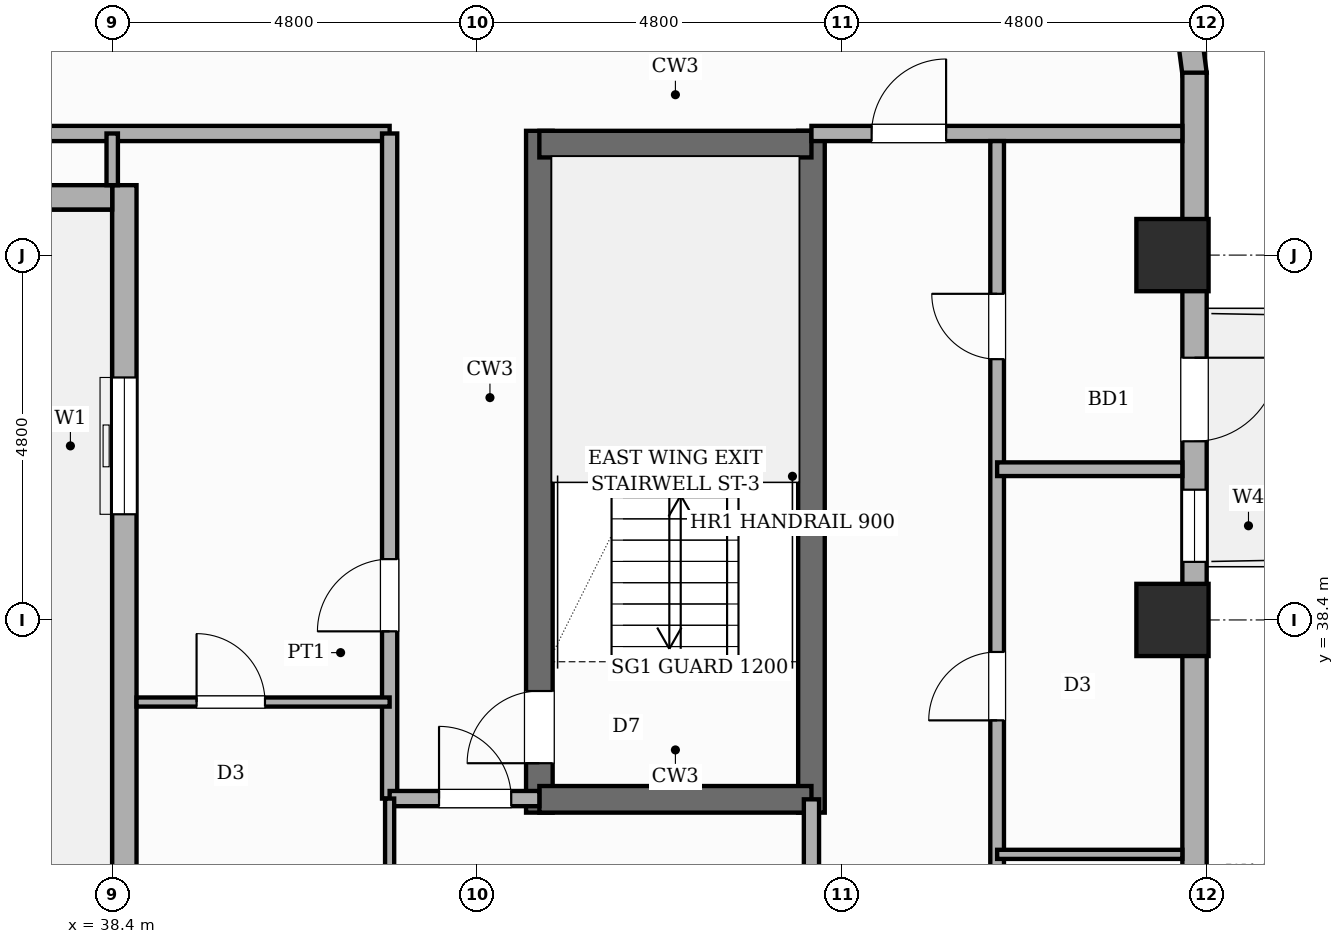
"""IFC4 building model, lengths in metres.
Left out: names, types, materials, properties, quantities, classifications, styles, units other than length and angle.
Written with IfcOpenShell. Run it as: python <this file> out.ifc"""

import sys

from ifc_helpers import new_model, si_unit, direction, frame, frame_2d, origin, origin_2d, place, context, subcontext, project, spatial, rectangle, extrude, element, fill, save


model = new_model("IFC4")
c1 = context("Model", 3, precision=1e-05, world=origin(), true_north=direction((0.0, 1.0)))
c2 = subcontext(c1, "Body", "Model", "MODEL_VIEW")
j1 = project(units=[si_unit("LENGTHUNIT", "METRE"), si_unit("PLANEANGLEUNIT", "RADIAN")], contexts=[c1])
p1 = place(None, origin())
s1 = spatial("IfcSite", under=j1, at=p1, CompositionType="ELEMENT")
p2 = place(p1, origin())
s2 = spatial("IfcBuilding", under=s1, at=p2, CompositionType="ELEMENT")
p3 = place(p2, frame((0.0, 0.0, 154.0)))
s3 = spatial("IfcBuildingStorey", under=s2, at=p3, CompositionType="ELEMENT", Elevation=154.0)
p4 = place(p3, frame((44.02, 35.865, 0.0), z_axis=(0.0, 0.0, 1.0), x_axis=(0.0, 1.0, 0.0)))
e1 = element("IfcWall", 1, at=p4, inside=s3, PredefinedType="SHEAR", context=c2, shape_type="SweptSolid", body=[
    extrude(rectangle(XDim=8.97, YDim=0.35, at=frame_2d((4.485, 0.0))), origin(), (0.0, 0.0, 1.0), 3.6),
])
p5 = place(p4, frame((0.65, 0.0, 0.0)))
e2 = element("IfcOpeningElement", 2, at=p5, cuts=e1, PredefinedType="OPENING", context=c2, shape_type="SweptSolid", body=[
    extrude(rectangle(XDim=0.95, YDim=2.1, at=frame_2d((0.475, 1.05))), frame((0.0, 0.185, 0.0), z_axis=(0.0, -1.0, 0.0), x_axis=(1.0, 0.0, 0.0)), (0.0, 0.0, 1.0), 0.37),
])
p6 = place(p3, frame((47.6, 35.865, 0.0), z_axis=(0.0, 0.0, 1.0), x_axis=(0.0, 1.0, 0.0)))
e3 = element("IfcWall", 3, at=p6, inside=s3, PredefinedType="SHEAR", context=c2, shape_type="SweptSolid", body=[
    extrude(rectangle(XDim=8.97, YDim=0.35, at=frame_2d((4.485, 0.0))), origin(), (0.0, 0.0, 1.0), 3.6),
])
for number, where, z_axis, x_axis in (
    (4, (44.02, 36.04, 0.0), (0.0, 0.0, 1.0), (1.0, 0.0, 0.0)),
    (5, (44.02, 44.66, 0.0), (0.0, 0.0, 1.0), (1.0, 0.0, 0.0)),
):
    element("IfcWall", number, at=place(p3, frame(where, z_axis=z_axis, x_axis=x_axis)), inside=s3, PredefinedType="SHEAR", context=c2, shape_type="SweptSolid", body=[
        extrude(rectangle(XDim=3.58, YDim=0.35, at=frame_2d((1.79, 0.0))), origin(), (0.0, 0.0, 1.0), 3.6),
    ])
for number, where, z_axis, x_axis in (
    (6, (52.35, 38.4, 0.0), (0.0, 0.0, 1.0), (1.0, 0.0, 0.0)),
    (7, (52.35, 43.2, 0.0), (0.0, 0.0, 1.0), (1.0, 0.0, 0.0)),
):
    element("IfcColumn", number, at=place(p3, frame(where, z_axis=z_axis, x_axis=x_axis)), inside=s3, PredefinedType="COLUMN", context=c2, shape_type="SweptSolid", body=[
        extrude(rectangle(XDim=0.95, YDim=0.95, at=origin_2d()), origin(), (0.0, 0.0, 1.0), 3.6),
    ])
p7 = place(p3, frame((52.56, 46.2, 0.0), z_axis=(0.0, 0.0, 1.0), x_axis=(0.130555323746, -0.9914410257, 0.0)))
e8 = element("IfcWall", 8, at=p7, inside=s3, PredefinedType="STANDARD", context=c2, shape_type="SweptSolid", body=[
    extrude(rectangle(XDim=0.626, YDim=0.32, at=frame_2d((0.313, 0.0))), origin(), (0.0, 0.0, 1.0), 2.54),
])
p8 = place(p3, frame((52.64, 45.6, 0.0), z_axis=(0.0, 0.0, 1.0), x_axis=(0.0, -1.0, 0.0)))
e9 = element("IfcWall", 9, at=p8, inside=s3, PredefinedType="STANDARD", context=c2, shape_type="SweptSolid", body=[
    extrude(rectangle(XDim=14.4, YDim=0.32, at=frame_2d((7.2, 0.0))), origin(), (0.0, 0.0, 1.0), 2.54),
])
p9 = place(p8, frame((3.75, 0.0, 0.0)))
e10 = element("IfcOpeningElement", 10, at=p9, cuts=e9, PredefinedType="OPENING", context=c2, shape_type="SweptSolid", body=[
    extrude(rectangle(XDim=1.1, YDim=2.15, at=frame_2d((0.55, 1.075))), frame((0.0, 0.17, 0.0), z_axis=(0.0, -1.0, 0.0), x_axis=(1.0, 0.0, 0.0)), (0.0, 0.0, 1.0), 0.34),
])
p10 = place(p8, frame((10.52, 0.0, 0.45)))
e11 = element("IfcOpeningElement", 11, at=p10, cuts=e9, PredefinedType="OPENING", context=c2, shape_type="SweptSolid", body=[
    extrude(rectangle(XDim=0.75, YDim=1.8, at=frame_2d((0.375, 0.9))), frame((0.0, 0.17, 0.0), z_axis=(0.0, -1.0, 0.0), x_axis=(1.0, 0.0, 0.0)), (0.0, 0.0, 1.0), 0.34),
])
p11 = place(p8, frame((5.486, 0.0, 0.45)))
e12 = element("IfcOpeningElement", 12, at=p11, cuts=e9, PredefinedType="OPENING", context=c2, shape_type="SweptSolid", body=[
    extrude(rectangle(XDim=0.95, YDim=1.8, at=frame_2d((0.475, 0.9))), frame((0.0, 0.17, 0.0), z_axis=(0.0, -1.0, 0.0), x_axis=(1.0, 0.0, 0.0)), (0.0, 0.0, 1.0), 0.34),
])
p12 = place(p3, frame((38.56, 28.8, 0.0), z_axis=(0.0, 0.0, 1.0), x_axis=(0.0, 1.0, 0.0)))
e13 = element("IfcWall", 13, at=p12, inside=s3, PredefinedType="STANDARD", context=c2, shape_type="SweptSolid", body=[
    extrude(rectangle(XDim=15.32, YDim=0.32, at=frame_2d((7.66, 0.0))), origin(), (0.0, 0.0, 1.0), 3.36),
])
p13 = place(p12, frame((10.99, 0.0, 0.8)))
e14 = element("IfcOpeningElement", 14, at=p13, cuts=e13, PredefinedType="OPENING", context=c2, shape_type="SweptSolid", body=[
    extrude(rectangle(XDim=1.8, YDim=2.1, at=frame_2d((0.9, 1.05))), frame((0.0, 0.17, 0.0), z_axis=(0.0, -1.0, 0.0), x_axis=(1.0, 0.0, 0.0)), (0.0, 0.0, 1.0), 0.34),
])
p14 = place(p12, frame((3.45, 0.0, 0.8)))
e15 = element("IfcOpeningElement", 15, at=p14, cuts=e13, PredefinedType="OPENING", context=c2, shape_type="SweptSolid", body=[
    extrude(rectangle(XDim=1.8, YDim=2.1, at=frame_2d((0.9, 1.05))), frame((0.0, 0.17, 0.0), z_axis=(0.0, -1.0, 0.0), x_axis=(1.0, 0.0, 0.0)), (0.0, 0.0, 1.0), 0.34),
])
p15 = place(p3, frame((38.4, 43.96, 0.0), z_axis=(0.0, 0.0, 1.0), x_axis=(-1.0, 0.0, 0.0)))
e16 = element("IfcWall", 16, at=p15, inside=s3, PredefinedType="STANDARD", context=c2, shape_type="SweptSolid", body=[
    extrude(rectangle(XDim=12.32, YDim=0.32, at=frame_2d((6.16, 0.0))), origin(), (0.0, 0.0, 1.0), 3.36),
])
p16 = place(p15, frame((5.26, 0.0, 0.8)))
e17 = element("IfcOpeningElement", 17, at=p16, cuts=e16, PredefinedType="OPENING", context=c2, shape_type="SweptSolid", body=[
    extrude(rectangle(XDim=1.8, YDim=2.1, at=frame_2d((0.9, 1.05))), frame((0.0, 0.17, 0.0), z_axis=(0.0, -1.0, 0.0), x_axis=(1.0, 0.0, 0.0)), (0.0, 0.0, 1.0), 0.34),
])
p17 = place(p3, frame((24.75, 44.8, 0.0), z_axis=(0.0, 0.0, 1.0), x_axis=(1.0, 0.0, 0.0)))
e18 = element("IfcWall", 18, at=p17, inside=s3, PredefinedType="PARTITIONING", context=c2, shape_type="SweptSolid", body=[
    extrude(rectangle(XDim=17.3, YDim=0.2, at=frame_2d((8.65, 0.0))), origin(), (0.0, 0.0, 1.0), 3.36),
])
p18 = place(p17, frame((6.2, 0.0, 0.0)))
e19 = element("IfcOpeningElement", 19, at=p18, cuts=e18, PredefinedType="OPENING", context=c2, shape_type="SweptSolid", body=[
    extrude(rectangle(XDim=0.95, YDim=2.15, at=frame_2d((0.475, 1.075))), frame((0.0, 0.11, 0.0), z_axis=(0.0, -1.0, 0.0), x_axis=(1.0, 0.0, 0.0)), (0.0, 0.0, 1.0), 0.22),
])
p19 = place(p3, frame((38.4, 44.12, 0.0), z_axis=(0.0, 0.0, 1.0), x_axis=(0.0, 1.0, 0.0)))
e20 = element("IfcWall", 20, at=p19, inside=s3, PredefinedType="PARTITIONING", context=c2, shape_type="SweptSolid", body=[
    extrude(rectangle(XDim=0.68, YDim=0.15, at=frame_2d((0.34, 0.0))), origin(), (0.0, 0.0, 1.0), 3.36),
])
p20 = place(p3, frame((47.6, 44.8, 0.0), z_axis=(0.0, 0.0, 1.0), x_axis=(1.0, 0.0, 0.0)))
e21 = element("IfcWall", 21, at=p20, inside=s3, PredefinedType="PARTITIONING", context=c2, shape_type="SweptSolid", body=[
    extrude(rectangle(XDim=4.88, YDim=0.2, at=frame_2d((2.44, 0.0))), origin(), (0.0, 0.0, 1.0), 3.36),
])
p21 = place(p20, frame((0.792, 0.0, 0.0)))
e22 = element("IfcOpeningElement", 22, at=p21, cuts=e21, PredefinedType="OPENING", context=c2, shape_type="SweptSolid", body=[
    extrude(rectangle(XDim=0.98, YDim=2.18, at=frame_2d((0.49, 1.09))), frame((0.0, 0.11, 0.0), z_axis=(0.0, -1.0, 0.0), x_axis=(1.0, 0.0, 0.0)), (0.0, 0.0, 1.0), 0.22),
])
p22 = place(p3, frame((42.05, 36.05, 0.0), z_axis=(0.0, 0.0, 1.0), x_axis=(0.0, 1.0, 0.0)))
e23 = element("IfcWall", 23, at=p22, inside=s3, PredefinedType="PARTITIONING", context=c2, shape_type="SweptSolid", body=[
    extrude(rectangle(XDim=8.75, YDim=0.2, at=frame_2d((4.375, 0.0))), origin(), (0.0, 0.0, 1.0), 3.36),
])
p23 = place(p22, frame((2.2, 0.0, 0.0)))
e24 = element("IfcOpeningElement", 24, at=p23, cuts=e23, PredefinedType="OPENING", context=c2, shape_type="SweptSolid", body=[
    extrude(rectangle(XDim=0.95, YDim=2.15, at=frame_2d((0.475, 1.075))), frame((0.0, 0.11, 0.0), z_axis=(0.0, -1.0, 0.0), x_axis=(1.0, 0.0, 0.0)), (0.0, 0.0, 1.0), 0.22),
])
p24 = place(p3, frame((42.05, 36.05, 0.0), z_axis=(0.0, 0.0, 1.0), x_axis=(1.0, 0.0, 0.0)))
e25 = element("IfcWall", 25, at=p24, inside=s3, PredefinedType="PARTITIONING", context=c2, shape_type="SweptSolid", body=[
    extrude(rectangle(XDim=1.97, YDim=0.2, at=frame_2d((0.985, 0.0))), origin(), (0.0, 0.0, 1.0), 3.36),
])
p25 = place(p24, frame((0.65, 0.0, 0.0)))
e26 = element("IfcOpeningElement", 26, at=p25, cuts=e25, PredefinedType="OPENING", context=c2, shape_type="SweptSolid", body=[
    extrude(rectangle(XDim=0.95, YDim=2.15, at=frame_2d((0.475, 1.075))), frame((0.0, 0.11, 0.0), z_axis=(0.0, -1.0, 0.0), x_axis=(1.0, 0.0, 0.0)), (0.0, 0.0, 1.0), 0.22),
])
p26 = place(p3, frame((38.72, 37.32, 0.0), z_axis=(0.0, 0.0, 1.0), x_axis=(1.0, 0.0, 0.0)))
e27 = element("IfcWall", 27, at=p26, inside=s3, PredefinedType="PARTITIONING", context=c2, shape_type="SweptSolid", body=[
    extrude(rectangle(XDim=3.33, YDim=0.12, at=frame_2d((1.665, 0.0))), origin(), (0.0, 0.0, 1.0), 3.36),
])
p27 = place(p26, frame((0.79, 0.0, 0.0)))
e28 = element("IfcOpeningElement", 28, at=p27, cuts=e27, PredefinedType="OPENING", context=c2, shape_type="SweptSolid", body=[
    extrude(rectangle(XDim=0.9, YDim=2.15, at=frame_2d((0.45, 1.075))), frame((0.0, 0.07, 0.0), z_axis=(0.0, -1.0, 0.0), x_axis=(1.0, 0.0, 0.0)), (0.0, 0.0, 1.0), 0.14),
])
p28 = place(p3, frame((42.05, 29.12, 0.0), z_axis=(0.0, 0.0, 1.0), x_axis=(0.0, 1.0, 0.0)))
e29 = element("IfcWall", 29, at=p28, inside=s3, PredefinedType="PARTITIONING", context=c2, shape_type="SweptSolid", body=[
    extrude(rectangle(XDim=6.93, YDim=0.12, at=frame_2d((3.465, 0.0))), origin(), (0.0, 0.0, 1.0), 3.36),
])
p29 = place(p3, frame((47.6, 29.12, 0.0), z_axis=(0.0, 0.0, 1.0), x_axis=(0.0, 1.0, 0.0)))
e30 = element("IfcWall", 30, at=p29, inside=s3, PredefinedType="SOLIDWALL", context=c2, shape_type="SweptSolid", body=[
    extrude(rectangle(XDim=6.92, YDim=0.2, at=frame_2d((3.46, 0.0))), origin(), (0.0, 0.0, 1.0), 3.36),
])
p30 = place(p3, frame((50.043, 29.12, 0.0), z_axis=(0.0, 0.0, 1.0), x_axis=(0.0, 1.0, 0.0)))
e31 = element("IfcWall", 31, at=p30, inside=s3, PredefinedType="PLUMBINGWALL", context=c2, shape_type="SweptSolid", body=[
    extrude(rectangle(XDim=15.58, YDim=0.18, at=frame_2d((7.79, 0.0))), origin(), (0.0, 0.0, 1.0), 3.36),
])
p31 = place(p30, frame((2.183, 0.0, 0.0)))
e32 = element("IfcOpeningElement", 32, at=p31, cuts=e31, PredefinedType="OPENING", context=c2, shape_type="SweptSolid", body=[
    extrude(rectangle(XDim=0.9, YDim=2.15, at=frame_2d((0.45, 1.075))), frame((0.0, 0.1, 0.0), z_axis=(0.0, -1.0, 0.0), x_axis=(1.0, 0.0, 0.0)), (0.0, 0.0, 1.0), 0.2),
])
p32 = place(p30, frame((7.959, 0.0, 0.0)))
e33 = element("IfcOpeningElement", 33, at=p32, cuts=e31, PredefinedType="OPENING", context=c2, shape_type="SweptSolid", body=[
    extrude(rectangle(XDim=0.9, YDim=2.15, at=frame_2d((0.45, 1.075))), frame((0.0, 0.1, 0.0), z_axis=(0.0, -1.0, 0.0), x_axis=(1.0, 0.0, 0.0)), (0.0, 0.0, 1.0), 0.2),
])
p33 = place(p30, frame((12.711, 0.0, 0.0)))
e34 = element("IfcOpeningElement", 34, at=p33, cuts=e31, PredefinedType="OPENING", context=c2, shape_type="SweptSolid", body=[
    extrude(rectangle(XDim=0.86, YDim=2.1, at=frame_2d((0.43, 1.05))), frame((0.0, 0.1, 0.0), z_axis=(0.0, -1.0, 0.0), x_axis=(1.0, 0.0, 0.0)), (0.0, 0.0, 1.0), 0.2),
])
p34 = place(p3, frame((50.043, 35.316, 0.0), z_axis=(0.0, 0.0, 1.0), x_axis=(1.0, 0.0, 0.0)))
e35 = element("IfcWall", 35, at=p34, inside=s3, PredefinedType="PARTITIONING", context=c2, shape_type="SweptSolid", body=[
    extrude(rectangle(XDim=2.437, YDim=0.12, at=frame_2d((1.219, 0.0))), origin(), (0.0, 0.0, 1.0), 3.36),
])
p35 = place(p3, frame((50.043, 40.383, 0.0), z_axis=(0.0, 0.0, 1.0), x_axis=(1.0, 0.0, 0.0)))
e36 = element("IfcWall", 36, at=p35, inside=s3, PredefinedType="PLUMBINGWALL", context=c2, shape_type="SweptSolid", body=[
    extrude(rectangle(XDim=2.437, YDim=0.18, at=frame_2d((1.219, 0.0))), origin(), (0.0, 0.0, 1.0), 3.36),
])
p36 = place(p9, origin())
e37 = element("IfcDoor", 37, at=p36, inside=s3, OperationType="SINGLE_SWING_LEFT", PredefinedType="DOOR", context=c2, shape_type="SweptSolid", body=[
    extrude(rectangle(XDim=1.1, YDim=2.15, at=frame_2d((0.55, 1.075))), frame((0.0, 0.025, 0.0), z_axis=(0.0, -1.0, 0.0), x_axis=(1.0, 0.0, 0.0)), (0.0, 0.0, 1.0), 0.05),
])
fill(e10, e37)
p37 = place(p11, origin())
e38 = element("IfcWindow", 38, at=p37, inside=s3, PartitioningType="SINGLE_PANEL", PredefinedType="WINDOW", context=c2, shape_type="SweptSolid", body=[
    extrude(rectangle(XDim=0.95, YDim=1.8, at=frame_2d((0.475, 0.9))), frame((0.0, 0.03, 0.0), z_axis=(0.0, -1.0, 0.0), x_axis=(1.0, 0.0, 0.0)), (0.0, 0.0, 1.0), 0.06),
])
fill(e12, e38)
p38 = place(p13, origin())
e39 = element("IfcWindow", 39, at=p38, inside=s3, PartitioningType="SINGLE_PANEL", PredefinedType="WINDOW", context=c2, shape_type="SweptSolid", body=[
    extrude(rectangle(XDim=1.8, YDim=2.1, at=frame_2d((0.9, 1.05))), frame((0.0, 0.03, 0.0), z_axis=(0.0, -1.0, 0.0), x_axis=(1.0, 0.0, 0.0)), (0.0, 0.0, 1.0), 0.06),
])
fill(e14, e39)
p39 = place(p5, origin())
e40 = element("IfcDoor", 40, at=p39, inside=s3, OperationType="SINGLE_SWING_LEFT", PredefinedType="DOOR", context=c2, shape_type="SweptSolid", body=[
    extrude(rectangle(XDim=0.95, YDim=2.1, at=frame_2d((0.475, 1.05))), frame((0.0, 0.025, 0.0), z_axis=(0.0, -1.0, 0.0), x_axis=(1.0, 0.0, 0.0)), (0.0, 0.0, 1.0), 0.05),
])
fill(e2, e40)
p40 = place(p23, origin())
e41 = element("IfcDoor", 41, at=p40, inside=s3, OperationType="SINGLE_SWING_LEFT", PredefinedType="DOOR", context=c2, shape_type="SweptSolid", body=[
    extrude(rectangle(XDim=0.95, YDim=2.15, at=frame_2d((0.475, 1.075))), frame((0.0, 0.025, 0.0), z_axis=(0.0, -1.0, 0.0), x_axis=(1.0, 0.0, 0.0)), (0.0, 0.0, 1.0), 0.05),
])
fill(e24, e41)
p41 = place(p27, origin())
e42 = element("IfcDoor", 42, at=p41, inside=s3, OperationType="SINGLE_SWING_LEFT", PredefinedType="DOOR", context=c2, shape_type="SweptSolid", body=[
    extrude(rectangle(XDim=0.9, YDim=2.15, at=frame_2d((0.45, 1.075))), frame((0.0, 0.025, 0.0), z_axis=(0.0, -1.0, 0.0), x_axis=(1.0, 0.0, 0.0)), (0.0, 0.0, 1.0), 0.05),
])
fill(e28, e42)
p42 = place(p25, origin())
e43 = element("IfcDoor", 43, at=p42, inside=s3, OperationType="SINGLE_SWING_LEFT", PredefinedType="DOOR", context=c2, shape_type="SweptSolid", body=[
    extrude(rectangle(XDim=0.95, YDim=2.15, at=frame_2d((0.475, 1.075))), frame((0.0, 0.025, 0.0), z_axis=(0.0, -1.0, 0.0), x_axis=(1.0, 0.0, 0.0)), (0.0, 0.0, 1.0), 0.05),
])
fill(e26, e43)
p43 = place(p21, origin())
e44 = element("IfcDoor", 44, at=p43, inside=s3, OperationType="SINGLE_SWING_RIGHT", PredefinedType="DOOR", context=c2, shape_type="SweptSolid", body=[
    extrude(rectangle(XDim=0.98, YDim=2.18, at=frame_2d((0.49, 1.09))), frame((0.0, 0.025, 0.0), z_axis=(0.0, -1.0, 0.0), x_axis=(1.0, 0.0, 0.0)), (0.0, 0.0, 1.0), 0.05),
])
fill(e22, e44)
p44 = place(p32, origin())
e45 = element("IfcDoor", 45, at=p44, inside=s3, OperationType="SINGLE_SWING_LEFT", PredefinedType="DOOR", context=c2, shape_type="SweptSolid", body=[
    extrude(rectangle(XDim=0.9, YDim=2.15, at=frame_2d((0.45, 1.075))), frame((0.0, 0.025, 0.0), z_axis=(0.0, -1.0, 0.0), x_axis=(1.0, 0.0, 0.0)), (0.0, 0.0, 1.0), 0.05),
])
fill(e33, e45)
p45 = place(p33, origin())
e46 = element("IfcDoor", 46, at=p45, inside=s3, OperationType="SINGLE_SWING_RIGHT", PredefinedType="DOOR", context=c2, shape_type="SweptSolid", body=[
    extrude(rectangle(XDim=0.86, YDim=2.1, at=frame_2d((0.43, 1.05))), frame((0.0, 0.025, 0.0), z_axis=(0.0, -1.0, 0.0), x_axis=(1.0, 0.0, 0.0)), (0.0, 0.0, 1.0), 0.05),
])
fill(e34, e46)
save(model, sys.argv[1])
